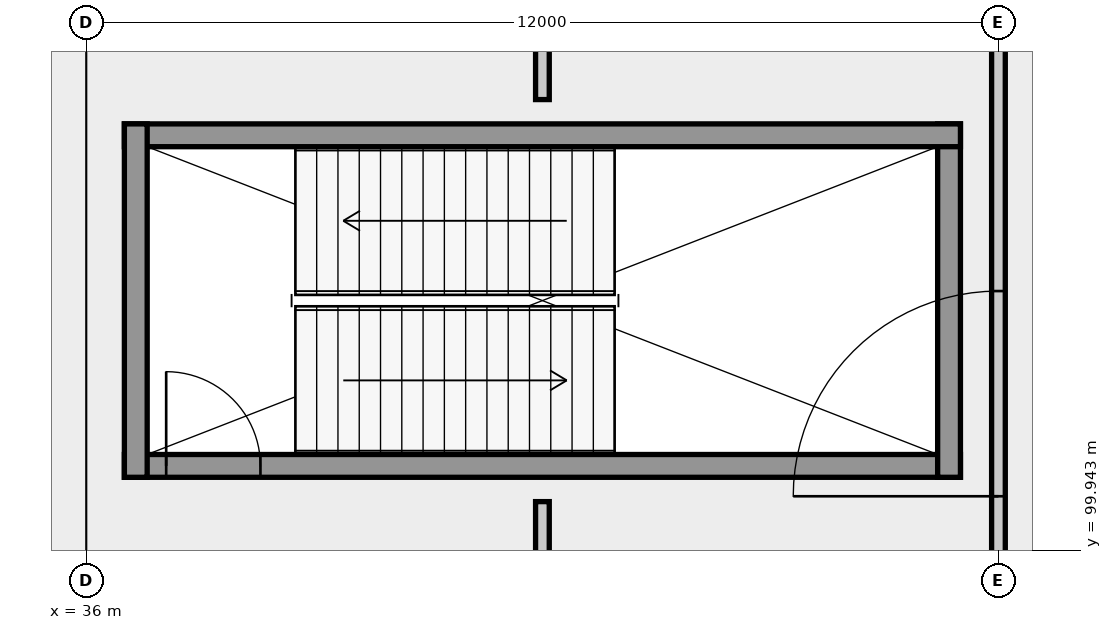
"""IFC4 building model, lengths in metres.
Left out: names, types, materials, properties, quantities, classifications, styles, units other than length and angle.
Written with IfcOpenShell. Run it as: python <this file> out.ifc"""

import sys

from ifc_helpers import new_model, si_unit, direction, frame, frame_2d, origin, place, context, subcontext, project, spatial, rectangle, extrude, element, fill, save


model = new_model("IFC4")
c1 = context("Model", 3, precision=1e-05, world=origin(), true_north=direction((0.0, 1.0)))
c2 = subcontext(c1, "Body", "Model", "MODEL_VIEW")
j1 = project(units=[si_unit("LENGTHUNIT", "METRE"), si_unit("PLANEANGLEUNIT", "RADIAN")], contexts=[c1])
p1 = place(None, origin())
s1 = spatial("IfcSite", under=j1, at=p1, CompositionType="ELEMENT")
p2 = place(p1, origin())
s2 = spatial("IfcBuilding", under=s1, at=p2, CompositionType="ELEMENT")
p3 = place(p2, frame((0.0, 0.0, 10.8)))
s3 = spatial("IfcBuildingStorey", under=s2, at=p3, CompositionType="ELEMENT", Elevation=10.8)
p4 = place(p3, frame((36.5, 101.05, 0.0), z_axis=(0.0, 0.0, 1.0), x_axis=(1.0, 0.0, 0.0)))
e1 = element("IfcWall", 1, at=p4, inside=s3, PredefinedType="SHEAR", context=c2, shape_type="SweptSolid", body=[
    extrude(rectangle(XDim=11.0, YDim=0.3, at=frame_2d((5.5, 0.0))), origin(), (0.0, 0.0, 1.0), 5.69),
])
p5 = place(p4, frame((0.55, 0.0, 0.0)))
e2 = element("IfcOpeningElement", 2, at=p5, cuts=e1, PredefinedType="OPENING", context=c2, shape_type="SweptSolid", body=[
    extrude(rectangle(XDim=1.24, YDim=2.25, at=frame_2d((0.62, 1.125))), frame((0.0, 0.16, 0.0), z_axis=(0.0, -1.0, 0.0), x_axis=(1.0, 0.0, 0.0)), (0.0, 0.0, 1.0), 0.32),
])
p6 = place(p3, frame((47.35, 100.9, 0.0), z_axis=(0.0, 0.0, 1.0), x_axis=(0.0, 1.0, 0.0)))
e3 = element("IfcWall", 3, at=p6, inside=s3, PredefinedType="SHEAR", context=c2, shape_type="SweptSolid", body=[
    extrude(rectangle(XDim=4.65, YDim=0.3, at=frame_2d((2.325, 0.0))), origin(), (0.0, 0.0, 1.0), 5.69),
])
p7 = place(p3, frame((47.5, 105.4, 0.0), z_axis=(0.0, 0.0, 1.0), x_axis=(-1.0, 0.0, 0.0)))
e4 = element("IfcWall", 4, at=p7, inside=s3, PredefinedType="SHEAR", context=c2, shape_type="SweptSolid", body=[
    extrude(rectangle(XDim=11.0, YDim=0.3, at=frame_2d((5.5, 0.0))), origin(), (0.0, 0.0, 1.0), 5.69),
])
p8 = place(p3, frame((36.65, 105.55, 0.0), z_axis=(0.0, 0.0, 1.0), x_axis=(0.0, -1.0, 0.0)))
e5 = element("IfcWall", 5, at=p8, inside=s3, PredefinedType="SHEAR", context=c2, shape_type="SweptSolid", body=[
    extrude(rectangle(XDim=4.65, YDim=0.3, at=frame_2d((2.325, 0.0))), origin(), (0.0, 0.0, 1.0), 5.69),
])
p9 = place(p3, frame((42.0, 84.38, 0.0), z_axis=(0.0, 0.0, 1.0), x_axis=(0.0, 1.0, 0.0)))
e6 = element("IfcWall", 6, at=p9, inside=s3, PredefinedType="PARTITIONING", context=c2, shape_type="SweptSolid", body=[
    extrude(rectangle(XDim=16.2, YDim=0.18, at=frame_2d((8.1, 0.0))), origin(), (0.0, 0.0, 1.0), 5.18),
])
p10 = place(p9, frame((3.71, 0.0, 0.0)))
e7 = element("IfcOpeningElement", 7, at=p10, cuts=e6, PredefinedType="OPENING", context=c2, shape_type="SweptSolid", body=[
    extrude(rectangle(XDim=2.3, YDim=2.6, at=frame_2d((1.15, 1.3))), frame((0.0, 0.1, 0.0), z_axis=(0.0, -1.0, 0.0), x_axis=(1.0, 0.0, 0.0)), (0.0, 0.0, 1.0), 0.2),
])
p11 = place(p3, frame((42.0, 105.87, 0.0), z_axis=(0.0, 0.0, 1.0), x_axis=(0.0, 1.0, 0.0)))
e8 = element("IfcWall", 8, at=p11, inside=s3, PredefinedType="PARTITIONING", context=c2, shape_type="SweptSolid", body=[
    extrude(rectangle(XDim=13.75, YDim=0.18, at=frame_2d((6.875, 0.0))), origin(), (0.0, 0.0, 1.0), 5.18),
])
p12 = place(p3, frame((48.0, 84.594, 0.0), z_axis=(0.0, 0.0, 1.0), x_axis=(0.0, 1.0, 0.0)))
e9 = element("IfcWall", 9, at=p12, inside=s3, PredefinedType="PARTITIONING", context=c2, shape_type="SweptSolid", body=[
    extrude(rectangle(XDim=34.811, YDim=0.18, at=frame_2d((17.406, 0.0))), origin(), (0.0, 0.0, 1.0), 5.18),
])
p13 = place(p12, frame((16.056, 0.0, 0.0)))
e10 = element("IfcOpeningElement", 10, at=p13, cuts=e9, PredefinedType="OPENING", context=c2, shape_type="SweptSolid", body=[
    extrude(rectangle(XDim=2.7, YDim=2.85, at=frame_2d((1.35, 1.425))), frame((0.0, 0.1, 0.0), z_axis=(0.0, -1.0, 0.0), x_axis=(1.0, 0.0, 0.0)), (0.0, 0.0, 1.0), 0.2),
])
p14 = place(p5, origin())
e11 = element("IfcDoor", 11, at=p14, inside=s3, OperationType="SINGLE_SWING_LEFT", PredefinedType="DOOR", context=c2, shape_type="SweptSolid", body=[
    extrude(rectangle(XDim=1.24, YDim=2.25, at=frame_2d((0.62, 1.125))), frame((0.0, 0.025, 0.0), z_axis=(0.0, -1.0, 0.0), x_axis=(1.0, 0.0, 0.0)), (0.0, 0.0, 1.0), 0.05),
])
fill(e2, e11)
p15 = place(p13, origin())
e12 = element("IfcDoor", 12, at=p15, inside=s3, OperationType="DOUBLE_DOOR_SINGLE_SWING", PredefinedType="DOOR", context=c2, shape_type="SweptSolid", body=[
    extrude(rectangle(XDim=2.7, YDim=2.85, at=frame_2d((1.35, 1.425))), frame((0.0, 0.025, 0.0), z_axis=(0.0, -1.0, 0.0), x_axis=(1.0, 0.0, 0.0)), (0.0, 0.0, 1.0), 0.05),
])
fill(e10, e12)
save(model, sys.argv[1])
